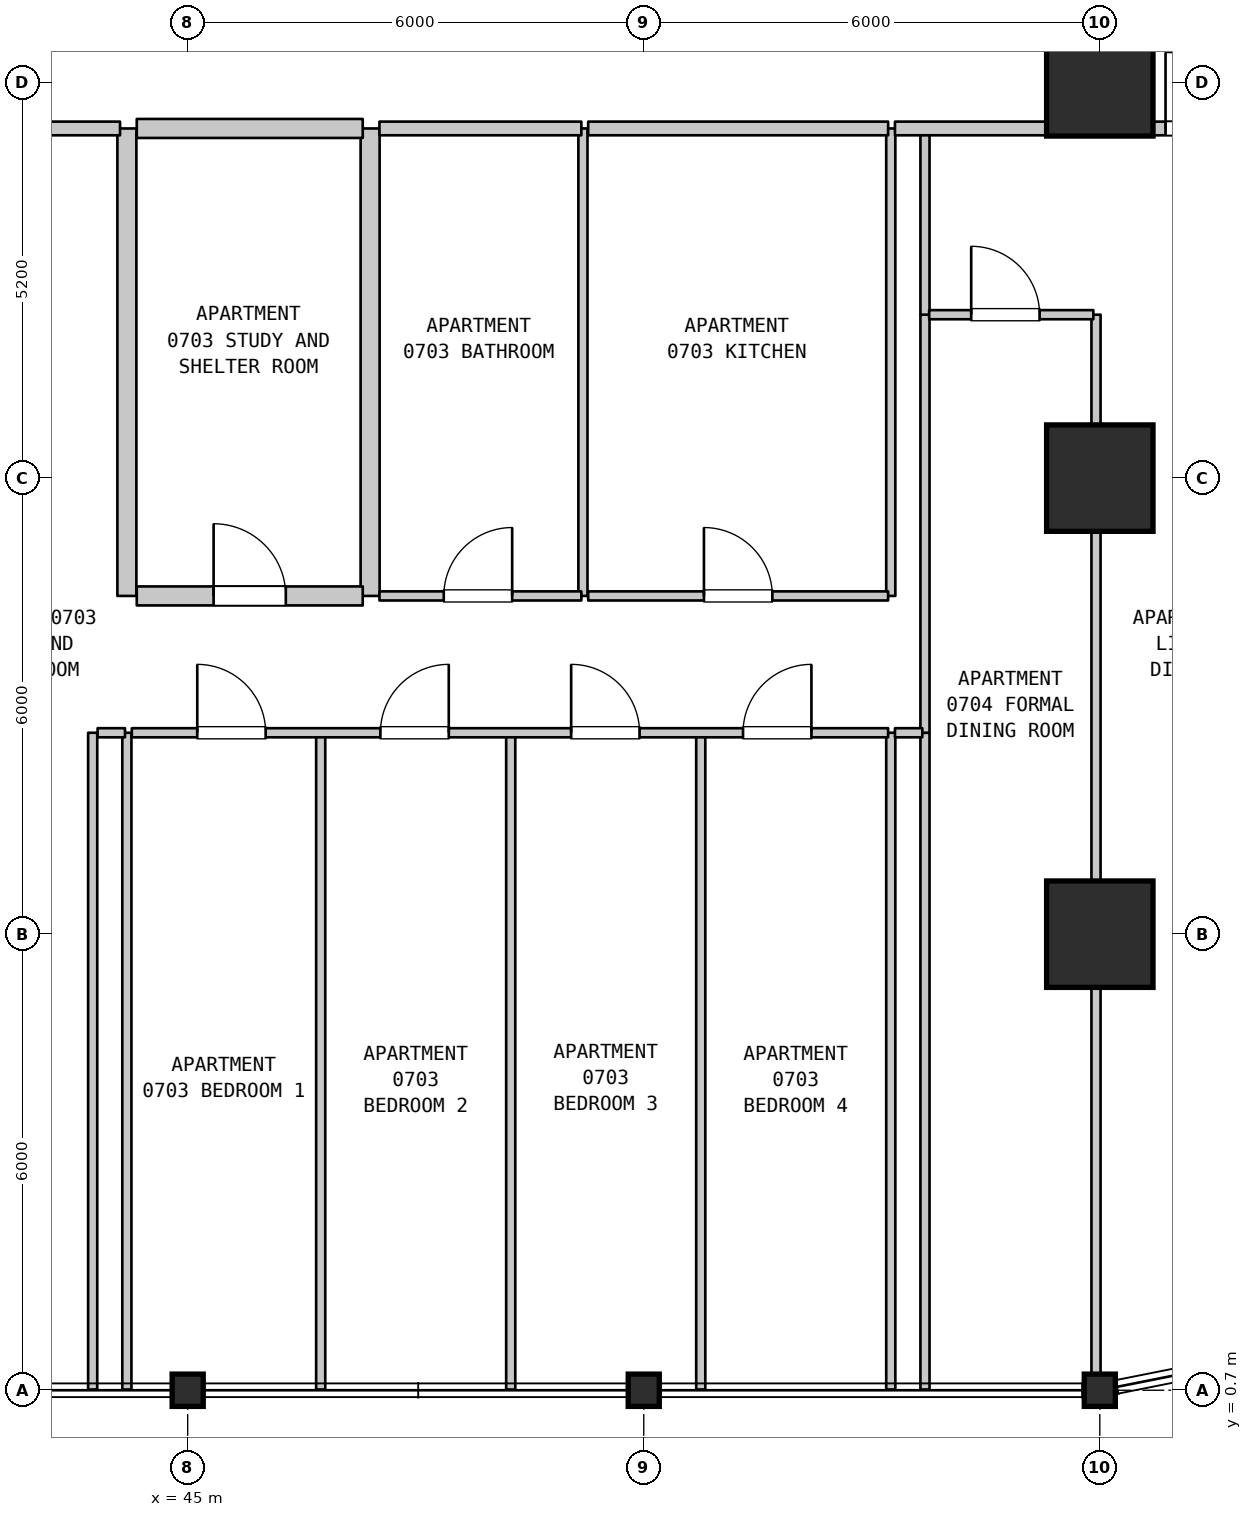
"""IFC4 building model, lengths in metres.
Left out: names, types, materials, properties, quantities, classifications, styles, units other than length and angle.
Written with IfcOpenShell. Run it as: python <this file> out.ifc"""

import sys

from ifc_helpers import new_model, si_unit, direction, frame, frame_2d, origin, origin_2d, place, context, subcontext, project, spatial, rectangle, i_section, extrude, element, fill, save


model = new_model("IFC4")
c1 = context("Model", 3, precision=1e-05, world=origin(), true_north=direction((0.0, 1.0)))
c2 = subcontext(c1, "Body", "Model", "MODEL_VIEW")
j1 = project(units=[si_unit("LENGTHUNIT", "METRE"), si_unit("PLANEANGLEUNIT", "RADIAN")], contexts=[c1])
p1 = place(None, origin())
s1 = spatial("IfcSite", under=j1, at=p1, CompositionType="ELEMENT")
p2 = place(p1, origin())
s2 = spatial("IfcBuilding", under=s1, at=p2, CompositionType="ELEMENT")
p3 = place(p2, frame((0.0, 0.0, 35.1)))
s3 = spatial("IfcBuildingStorey", under=s2, at=p3, CompositionType="ELEMENT", Elevation=35.1)
for number, where, z_axis, x_axis in (
    (1, (45.0, 0.7, 0.0), (0.0, 0.0, 1.0), (1.0, 0.0, 0.0)),
    (2, (51.0, 0.7, 0.0), (0.0, 0.0, 1.0), (1.0, 0.0, 0.0)),
    (3, (57.0, 0.7, 0.0), (0.0, 0.0, 1.0), (1.0, 0.0, 0.0)),
):
    element("IfcColumn", number, at=place(p3, frame(where, z_axis=z_axis, x_axis=x_axis)), inside=s3, PredefinedType="COLUMN", context=c2, shape_type="SweptSolid", body=[
        extrude(i_section(OverallWidth=0.409, OverallDepth=0.425, WebThickness=0.032, FlangeThickness=0.052, FilletRadius=0.015, at=origin_2d()), origin(), (0.0, 0.0, 1.0), 3.7),
    ])
for number, where, z_axis, x_axis in (
    (4, (57.0, 6.7, 0.0), (0.0, 0.0, 1.0), (1.0, 0.0, 0.0)),
    (5, (57.0, 12.7, 0.0), (0.0, 0.0, 1.0), (1.0, 0.0, 0.0)),
    (6, (57.0, 17.9, 0.0), (0.0, 0.0, 1.0), (1.0, 0.0, 0.0)),
):
    element("IfcColumn", number, at=place(p3, frame(where, z_axis=z_axis, x_axis=x_axis)), inside=s3, PredefinedType="COLUMN", context=c2, shape_type="SweptSolid", body=[
        extrude(rectangle(XDim=1.4, YDim=1.4, at=origin_2d()), origin(), (0.0, 0.0, 1.0), 3.7),
    ])
for number, where, z_axis, x_axis in (
    (7, (43.75, 0.71, 0.0), (0.0, 0.0, 1.0), (0.0, 1.0, 0.0)),
    (8, (44.2, 0.71, 0.0), (0.0, 0.0, 1.0), (0.0, 1.0, 0.0)),
):
    element("IfcWall", number, at=place(p3, frame(where, z_axis=z_axis, x_axis=x_axis)), inside=s3, PredefinedType="PARTITIONING", context=c2, shape_type="SweptSolid", body=[
        extrude(rectangle(XDim=8.64, YDim=0.12, at=frame_2d((4.32, 0.0))), origin(), (0.0, 0.0, 1.0), 3.385),
    ])
p4 = place(p3, frame((44.2, 11.15, 0.0), z_axis=(0.0, 0.0, 1.0), x_axis=(0.0, 1.0, 0.0)))
e9 = element("IfcWall", 9, at=p4, inside=s3, PredefinedType="STANDARD", context=c2, shape_type="SweptSolid", body=[
    extrude(rectangle(XDim=6.15, YDim=0.25, at=frame_2d((3.075, 0.0))), origin(), (0.0, 0.0, 1.0), 3.385),
])
p5 = place(p3, frame((46.75, 0.71, 0.0), z_axis=(0.0, 0.0, 1.0), x_axis=(0.0, 1.0, 0.0)))
e10 = element("IfcWall", 10, at=p5, inside=s3, PredefinedType="PARTITIONING", context=c2, shape_type="SweptSolid", body=[
    extrude(rectangle(XDim=8.64, YDim=0.12, at=frame_2d((4.32, 0.0))), origin(), (0.0, 0.0, 1.0), 3.385),
])
p6 = place(p3, frame((47.4, 11.15, 0.0), z_axis=(0.0, 0.0, 1.0), x_axis=(0.0, 1.0, 0.0)))
e11 = element("IfcWall", 11, at=p6, inside=s3, PredefinedType="STANDARD", context=c2, shape_type="SweptSolid", body=[
    extrude(rectangle(XDim=6.15, YDim=0.25, at=frame_2d((3.075, 0.0))), origin(), (0.0, 0.0, 1.0), 3.385),
])
p7 = place(p3, frame((49.25, 0.71, 0.0), z_axis=(0.0, 0.0, 1.0), x_axis=(0.0, 1.0, 0.0)))
e12 = element("IfcWall", 12, at=p7, inside=s3, PredefinedType="PARTITIONING", context=c2, shape_type="SweptSolid", body=[
    extrude(rectangle(XDim=8.64, YDim=0.12, at=frame_2d((4.32, 0.0))), origin(), (0.0, 0.0, 1.0), 3.385),
])
p8 = place(p3, frame((50.2, 11.15, 0.0), z_axis=(0.0, 0.0, 1.0), x_axis=(0.0, 1.0, 0.0)))
e13 = element("IfcWall", 13, at=p8, inside=s3, PredefinedType="PARTITIONING", context=c2, shape_type="SweptSolid", body=[
    extrude(rectangle(XDim=6.15, YDim=0.12, at=frame_2d((3.075, 0.0))), origin(), (0.0, 0.0, 1.0), 3.385),
])
for number, where, z_axis, x_axis in (
    (14, (51.75, 0.71, 0.0), (0.0, 0.0, 1.0), (0.0, 1.0, 0.0)),
    (15, (54.25, 0.71, 0.0), (0.0, 0.0, 1.0), (0.0, 1.0, 0.0)),
):
    element("IfcWall", number, at=place(p3, frame(where, z_axis=z_axis, x_axis=x_axis)), inside=s3, PredefinedType="PARTITIONING", context=c2, shape_type="SweptSolid", body=[
        extrude(rectangle(XDim=8.64, YDim=0.12, at=frame_2d((4.32, 0.0))), origin(), (0.0, 0.0, 1.0), 3.385),
    ])
p9 = place(p3, frame((54.25, 11.15, 0.0), z_axis=(0.0, 0.0, 1.0), x_axis=(0.0, 1.0, 0.0)))
e16 = element("IfcWall", 16, at=p9, inside=s3, PredefinedType="PARTITIONING", context=c2, shape_type="SweptSolid", body=[
    extrude(rectangle(XDim=6.15, YDim=0.12, at=frame_2d((3.075, 0.0))), origin(), (0.0, 0.0, 1.0), 3.385),
])
p10 = place(p3, frame((54.7, 0.71, 0.0), z_axis=(0.0, 0.0, 1.0), x_axis=(0.0, 1.0, 0.0)))
e17 = element("IfcWall", 17, at=p10, inside=s3, PredefinedType="PARTITIONING", context=c2, shape_type="SweptSolid", body=[
    extrude(rectangle(XDim=8.64, YDim=0.12, at=frame_2d((4.32, 0.0))), origin(), (0.0, 0.0, 1.0), 3.385),
])
p11 = place(p3, frame((54.7, 9.35, 0.0), z_axis=(0.0, 0.0, 1.0), x_axis=(0.0, 1.0, 0.0)))
e18 = element("IfcWall", 18, at=p11, inside=s3, PredefinedType="PARTITIONING", context=c2, shape_type="SweptSolid", body=[
    extrude(rectangle(XDim=5.5, YDim=0.12, at=frame_2d((2.75, 0.0))), origin(), (0.0, 0.0, 1.0), 3.385),
])
p12 = place(p3, frame((54.7, 14.85, 0.0), z_axis=(0.0, 0.0, 1.0), x_axis=(0.0, 1.0, 0.0)))
e19 = element("IfcWall", 19, at=p12, inside=s3, PredefinedType="PARTITIONING", context=c2, shape_type="SweptSolid", body=[
    extrude(rectangle(XDim=2.45, YDim=0.12, at=frame_2d((1.225, 0.0))), origin(), (0.0, 0.0, 1.0), 3.385),
])
p13 = place(p3, frame((56.95, 0.724, 0.0), z_axis=(0.0, 0.0, 1.0), x_axis=(0.0, 1.0, 0.0)))
e20 = element("IfcWall", 20, at=p13, inside=s3, PredefinedType="PARTITIONING", context=c2, shape_type="SweptSolid", body=[
    extrude(rectangle(XDim=14.126, YDim=0.12, at=frame_2d((7.063, 0.0))), origin(), (0.0, 0.0, 1.0), 2.885),
])
p14 = place(p3, frame((43.815, 9.35, 0.0), z_axis=(0.0, 0.0, 1.0), x_axis=(1.0, 0.0, 0.0)))
e21 = element("IfcWall", 21, at=p14, inside=s3, PredefinedType="PARTITIONING", context=c2, shape_type="SweptSolid", body=[
    extrude(rectangle(XDim=0.36, YDim=0.12, at=frame_2d((0.18, 0.0))), origin(), (0.0, 0.0, 1.0), 3.385),
])
p15 = place(p3, frame((44.265, 9.35, 0.0), z_axis=(0.0, 0.0, 1.0), x_axis=(1.0, 0.0, 0.0)))
e22 = element("IfcWall", 22, at=p15, inside=s3, PredefinedType="PARTITIONING", context=c2, shape_type="SweptSolid", body=[
    extrude(rectangle(XDim=9.95, YDim=0.12, at=frame_2d((4.975, 0.0))), origin(), (0.0, 0.0, 1.0), 3.385),
])
p16 = place(p15, frame((0.861, 0.0, 0.0)))
e23 = element("IfcOpeningElement", 23, at=p16, cuts=e22, PredefinedType="OPENING", context=c2, shape_type="SweptSolid", body=[
    extrude(rectangle(XDim=0.9, YDim=2.15, at=frame_2d((0.45, 1.075))), frame((0.0, 0.07, 0.0), z_axis=(0.0, -1.0, 0.0), x_axis=(1.0, 0.0, 0.0)), (0.0, 0.0, 1.0), 0.14),
])
p17 = place(p15, frame((3.27, 0.0, 0.0)))
e24 = element("IfcOpeningElement", 24, at=p17, cuts=e22, PredefinedType="OPENING", context=c2, shape_type="SweptSolid", body=[
    extrude(rectangle(XDim=0.9, YDim=2.15, at=frame_2d((0.45, 1.075))), frame((0.0, 0.07, 0.0), z_axis=(0.0, -1.0, 0.0), x_axis=(1.0, 0.0, 0.0)), (0.0, 0.0, 1.0), 0.14),
])
p18 = place(p15, frame((5.78, 0.0, 0.0)))
e25 = element("IfcOpeningElement", 25, at=p18, cuts=e22, PredefinedType="OPENING", context=c2, shape_type="SweptSolid", body=[
    extrude(rectangle(XDim=0.9, YDim=2.15, at=frame_2d((0.45, 1.075))), frame((0.0, 0.07, 0.0), z_axis=(0.0, -1.0, 0.0), x_axis=(1.0, 0.0, 0.0)), (0.0, 0.0, 1.0), 0.14),
])
p19 = place(p15, frame((8.041, 0.0, 0.0)))
e26 = element("IfcOpeningElement", 26, at=p19, cuts=e22, PredefinedType="OPENING", context=c2, shape_type="SweptSolid", body=[
    extrude(rectangle(XDim=0.9, YDim=2.15, at=frame_2d((0.45, 1.075))), frame((0.0, 0.07, 0.0), z_axis=(0.0, -1.0, 0.0), x_axis=(1.0, 0.0, 0.0)), (0.0, 0.0, 1.0), 0.14),
])
p20 = place(p3, frame((54.305, 9.35, 0.0), z_axis=(0.0, 0.0, 1.0), x_axis=(1.0, 0.0, 0.0)))
e27 = element("IfcWall", 27, at=p20, inside=s3, PredefinedType="PARTITIONING", context=c2, shape_type="SweptSolid", body=[
    extrude(rectangle(XDim=0.36, YDim=0.12, at=frame_2d((0.18, 0.0))), origin(), (0.0, 0.0, 1.0), 3.385),
])
p21 = place(p3, frame((44.33, 11.15, 0.0), z_axis=(0.0, 0.0, 1.0), x_axis=(1.0, 0.0, 0.0)))
e28 = element("IfcWall", 28, at=p21, inside=s3, PredefinedType="STANDARD", context=c2, shape_type="SweptSolid", body=[
    extrude(rectangle(XDim=2.973, YDim=0.25, at=frame_2d((1.486, 0.0))), origin(), (0.0, 0.0, 1.0), 3.385),
])
p22 = place(p21, frame((1.011, 0.0, 0.0)))
e29 = element("IfcOpeningElement", 29, at=p22, cuts=e28, PredefinedType="OPENING", context=c2, shape_type="SweptSolid", body=[
    extrude(rectangle(XDim=0.95, YDim=2.15, at=frame_2d((0.475, 1.075))), frame((0.0, 0.135, 0.0), z_axis=(0.0, -1.0, 0.0), x_axis=(1.0, 0.0, 0.0)), (0.0, 0.0, 1.0), 0.27),
])
p23 = place(p3, frame((47.523, 11.15, 0.0), z_axis=(0.0, 0.0, 1.0), x_axis=(1.0, 0.0, 0.0)))
e30 = element("IfcWall", 30, at=p23, inside=s3, PredefinedType="PARTITIONING", context=c2, shape_type="SweptSolid", body=[
    extrude(rectangle(XDim=2.656, YDim=0.12, at=frame_2d((1.328, 0.0))), origin(), (0.0, 0.0, 1.0), 3.385),
])
p24 = place(p23, frame((0.846, 0.0, 0.0)))
e31 = element("IfcOpeningElement", 31, at=p24, cuts=e30, PredefinedType="OPENING", context=c2, shape_type="SweptSolid", body=[
    extrude(rectangle(XDim=0.9, YDim=2.1, at=frame_2d((0.45, 1.05))), frame((0.0, 0.07, 0.0), z_axis=(0.0, -1.0, 0.0), x_axis=(1.0, 0.0, 0.0)), (0.0, 0.0, 1.0), 0.14),
])
p25 = place(p3, frame((50.269, 11.15, 0.0), z_axis=(0.0, 0.0, 1.0), x_axis=(1.0, 0.0, 0.0)))
e32 = element("IfcWall", 32, at=p25, inside=s3, PredefinedType="PARTITIONING", context=c2, shape_type="SweptSolid", body=[
    extrude(rectangle(XDim=3.946, YDim=0.12, at=frame_2d((1.973, 0.0))), origin(), (0.0, 0.0, 1.0), 3.385),
])
p26 = place(p25, frame((1.523, 0.0, 0.0)))
e33 = element("IfcOpeningElement", 33, at=p26, cuts=e32, PredefinedType="OPENING", context=c2, shape_type="SweptSolid", body=[
    extrude(rectangle(XDim=0.9, YDim=2.15, at=frame_2d((0.45, 1.075))), frame((0.0, 0.07, 0.0), z_axis=(0.0, -1.0, 0.0), x_axis=(1.0, 0.0, 0.0)), (0.0, 0.0, 1.0), 0.14),
])
p27 = place(p3, frame((54.755, 14.85, 0.0), z_axis=(0.0, 0.0, 1.0), x_axis=(1.0, 0.0, 0.0)))
e34 = element("IfcWall", 34, at=p27, inside=s3, PredefinedType="PARTITIONING", context=c2, shape_type="SweptSolid", body=[
    extrude(rectangle(XDim=2.16, YDim=0.12, at=frame_2d((1.08, 0.0))), origin(), (0.0, 0.0, 1.0), 3.385),
])
p28 = place(p27, frame((0.553, 0.0, 0.0)))
e35 = element("IfcOpeningElement", 35, at=p28, cuts=e34, PredefinedType="OPENING", context=c2, shape_type="SweptSolid", body=[
    extrude(rectangle(XDim=0.9, YDim=2.15, at=frame_2d((0.45, 1.075))), frame((0.0, 0.07, 0.0), z_axis=(0.0, -1.0, 0.0), x_axis=(1.0, 0.0, 0.0)), (0.0, 0.0, 1.0), 0.14),
])
p29 = place(p3, frame((38.565, 17.3, 0.0), z_axis=(0.0, 0.0, 1.0), x_axis=(1.0, 0.0, 0.0)))
e36 = element("IfcWall", 36, at=p29, inside=s3, PredefinedType="STANDARD", context=c2, shape_type="SweptSolid", body=[
    extrude(rectangle(XDim=5.545, YDim=0.18, at=frame_2d((2.772, 0.0))), origin(), (0.0, 0.0, 1.0), 3.385),
])
p30 = place(p29, frame((2.435, 0.0, 0.0)))
e37 = element("IfcOpeningElement", 37, at=p30, cuts=e36, PredefinedType="OPENING", context=c2, shape_type="SweptSolid", body=[
    extrude(rectangle(XDim=1.0, YDim=2.15, at=frame_2d((0.5, 1.075))), frame((0.0, 0.1, 0.0), z_axis=(0.0, -1.0, 0.0), x_axis=(1.0, 0.0, 0.0)), (0.0, 0.0, 1.0), 0.2),
])
p31 = place(p3, frame((44.33, 17.3, 0.0), z_axis=(0.0, 0.0, 1.0), x_axis=(1.0, 0.0, 0.0)))
e38 = element("IfcWall", 38, at=p31, inside=s3, PredefinedType="STANDARD", context=c2, shape_type="SweptSolid", body=[
    extrude(rectangle(XDim=2.973, YDim=0.25, at=frame_2d((1.486, 0.0))), origin(), (0.0, 0.0, 1.0), 3.385),
])
p32 = place(p3, frame((47.523, 17.3, 0.0), z_axis=(0.0, 0.0, 1.0), x_axis=(1.0, 0.0, 0.0)))
e39 = element("IfcWall", 39, at=p32, inside=s3, PredefinedType="STANDARD", context=c2, shape_type="SweptSolid", body=[
    extrude(rectangle(XDim=2.656, YDim=0.18, at=frame_2d((1.328, 0.0))), origin(), (0.0, 0.0, 1.0), 3.385),
])
p33 = place(p3, frame((50.269, 17.3, 0.0), z_axis=(0.0, 0.0, 1.0), x_axis=(1.0, 0.0, 0.0)))
e40 = element("IfcWall", 40, at=p33, inside=s3, PredefinedType="STANDARD", context=c2, shape_type="SweptSolid", body=[
    extrude(rectangle(XDim=3.946, YDim=0.18, at=frame_2d((1.973, 0.0))), origin(), (0.0, 0.0, 1.0), 3.385),
])
p34 = place(p3, frame((54.305, 17.3, 0.0), z_axis=(0.0, 0.0, 1.0), x_axis=(1.0, 0.0, 0.0)))
e41 = element("IfcWall", 41, at=p34, inside=s3, PredefinedType="STANDARD", context=c2, shape_type="SweptSolid", body=[
    extrude(rectangle(XDim=5.545, YDim=0.18, at=frame_2d((2.772, 0.0))), origin(), (0.0, 0.0, 1.0), 3.385),
])
p35 = place(p34, frame((3.56, 0.0, 0.0)))
e42 = element("IfcOpeningElement", 42, at=p35, cuts=e41, PredefinedType="OPENING", context=c2, shape_type="SweptSolid", body=[
    extrude(rectangle(XDim=1.0, YDim=2.15, at=frame_2d((0.5, 1.075))), frame((0.0, 0.1, 0.0), z_axis=(0.0, -1.0, 0.0), x_axis=(1.0, 0.0, 0.0)), (0.0, 0.0, 1.0), 0.2),
])
p36 = place(p16, origin())
e43 = element("IfcDoor", 43, at=p36, inside=s3, OperationType="SINGLE_SWING_LEFT", PredefinedType="DOOR", context=c2, shape_type="SweptSolid", body=[
    extrude(rectangle(XDim=0.9, YDim=2.15, at=frame_2d((0.45, 1.075))), frame((0.0, 0.025, 0.0), z_axis=(0.0, -1.0, 0.0), x_axis=(1.0, 0.0, 0.0)), (0.0, 0.0, 1.0), 0.05),
])
fill(e23, e43)
p37 = place(p17, origin())
e44 = element("IfcDoor", 44, at=p37, inside=s3, OperationType="SINGLE_SWING_RIGHT", PredefinedType="DOOR", context=c2, shape_type="SweptSolid", body=[
    extrude(rectangle(XDim=0.9, YDim=2.15, at=frame_2d((0.45, 1.075))), frame((0.0, 0.025, 0.0), z_axis=(0.0, -1.0, 0.0), x_axis=(1.0, 0.0, 0.0)), (0.0, 0.0, 1.0), 0.05),
])
fill(e24, e44)
p38 = place(p18, origin())
e45 = element("IfcDoor", 45, at=p38, inside=s3, OperationType="SINGLE_SWING_LEFT", PredefinedType="DOOR", context=c2, shape_type="SweptSolid", body=[
    extrude(rectangle(XDim=0.9, YDim=2.15, at=frame_2d((0.45, 1.075))), frame((0.0, 0.025, 0.0), z_axis=(0.0, -1.0, 0.0), x_axis=(1.0, 0.0, 0.0)), (0.0, 0.0, 1.0), 0.05),
])
fill(e25, e45)
p39 = place(p19, origin())
e46 = element("IfcDoor", 46, at=p39, inside=s3, OperationType="SINGLE_SWING_RIGHT", PredefinedType="DOOR", context=c2, shape_type="SweptSolid", body=[
    extrude(rectangle(XDim=0.9, YDim=2.15, at=frame_2d((0.45, 1.075))), frame((0.0, 0.025, 0.0), z_axis=(0.0, -1.0, 0.0), x_axis=(1.0, 0.0, 0.0)), (0.0, 0.0, 1.0), 0.05),
])
fill(e26, e46)
p40 = place(p22, origin())
e47 = element("IfcDoor", 47, at=p40, inside=s3, OperationType="SINGLE_SWING_LEFT", PredefinedType="DOOR", context=c2, shape_type="SweptSolid", body=[
    extrude(rectangle(XDim=0.95, YDim=2.15, at=frame_2d((0.475, 1.075))), frame((0.0, 0.025, 0.0), z_axis=(0.0, -1.0, 0.0), x_axis=(1.0, 0.0, 0.0)), (0.0, 0.0, 1.0), 0.05),
])
fill(e29, e47)
p41 = place(p24, origin())
e48 = element("IfcDoor", 48, at=p41, inside=s3, OperationType="SINGLE_SWING_RIGHT", PredefinedType="DOOR", context=c2, shape_type="SweptSolid", body=[
    extrude(rectangle(XDim=0.9, YDim=2.1, at=frame_2d((0.45, 1.05))), frame((0.0, 0.025, 0.0), z_axis=(0.0, -1.0, 0.0), x_axis=(1.0, 0.0, 0.0)), (0.0, 0.0, 1.0), 0.05),
])
fill(e31, e48)
p42 = place(p26, origin())
e49 = element("IfcDoor", 49, at=p42, inside=s3, OperationType="SINGLE_SWING_LEFT", PredefinedType="DOOR", context=c2, shape_type="SweptSolid", body=[
    extrude(rectangle(XDim=0.9, YDim=2.15, at=frame_2d((0.45, 1.075))), frame((0.0, 0.025, 0.0), z_axis=(0.0, -1.0, 0.0), x_axis=(1.0, 0.0, 0.0)), (0.0, 0.0, 1.0), 0.05),
])
fill(e33, e49)
p43 = place(p28, origin())
e50 = element("IfcDoor", 50, at=p43, inside=s3, OperationType="SINGLE_SWING_LEFT", PredefinedType="DOOR", context=c2, shape_type="SweptSolid", body=[
    extrude(rectangle(XDim=0.9, YDim=2.15, at=frame_2d((0.45, 1.075))), frame((0.0, 0.025, 0.0), z_axis=(0.0, -1.0, 0.0), x_axis=(1.0, 0.0, 0.0)), (0.0, 0.0, 1.0), 0.05),
])
fill(e35, e50)
p44 = place(p35, origin())
e51 = element("IfcDoor", 51, at=p44, inside=s3, OperationType="SINGLE_SWING_LEFT", PredefinedType="DOOR", context=c2, shape_type="SweptSolid", body=[
    extrude(rectangle(XDim=1.0, YDim=2.15, at=frame_2d((0.5, 1.075))), frame((0.0, 0.025, 0.0), z_axis=(0.0, -1.0, 0.0), x_axis=(1.0, 0.0, 0.0)), (0.0, 0.0, 1.0), 0.05),
])
fill(e42, e51)
save(model, sys.argv[1])
